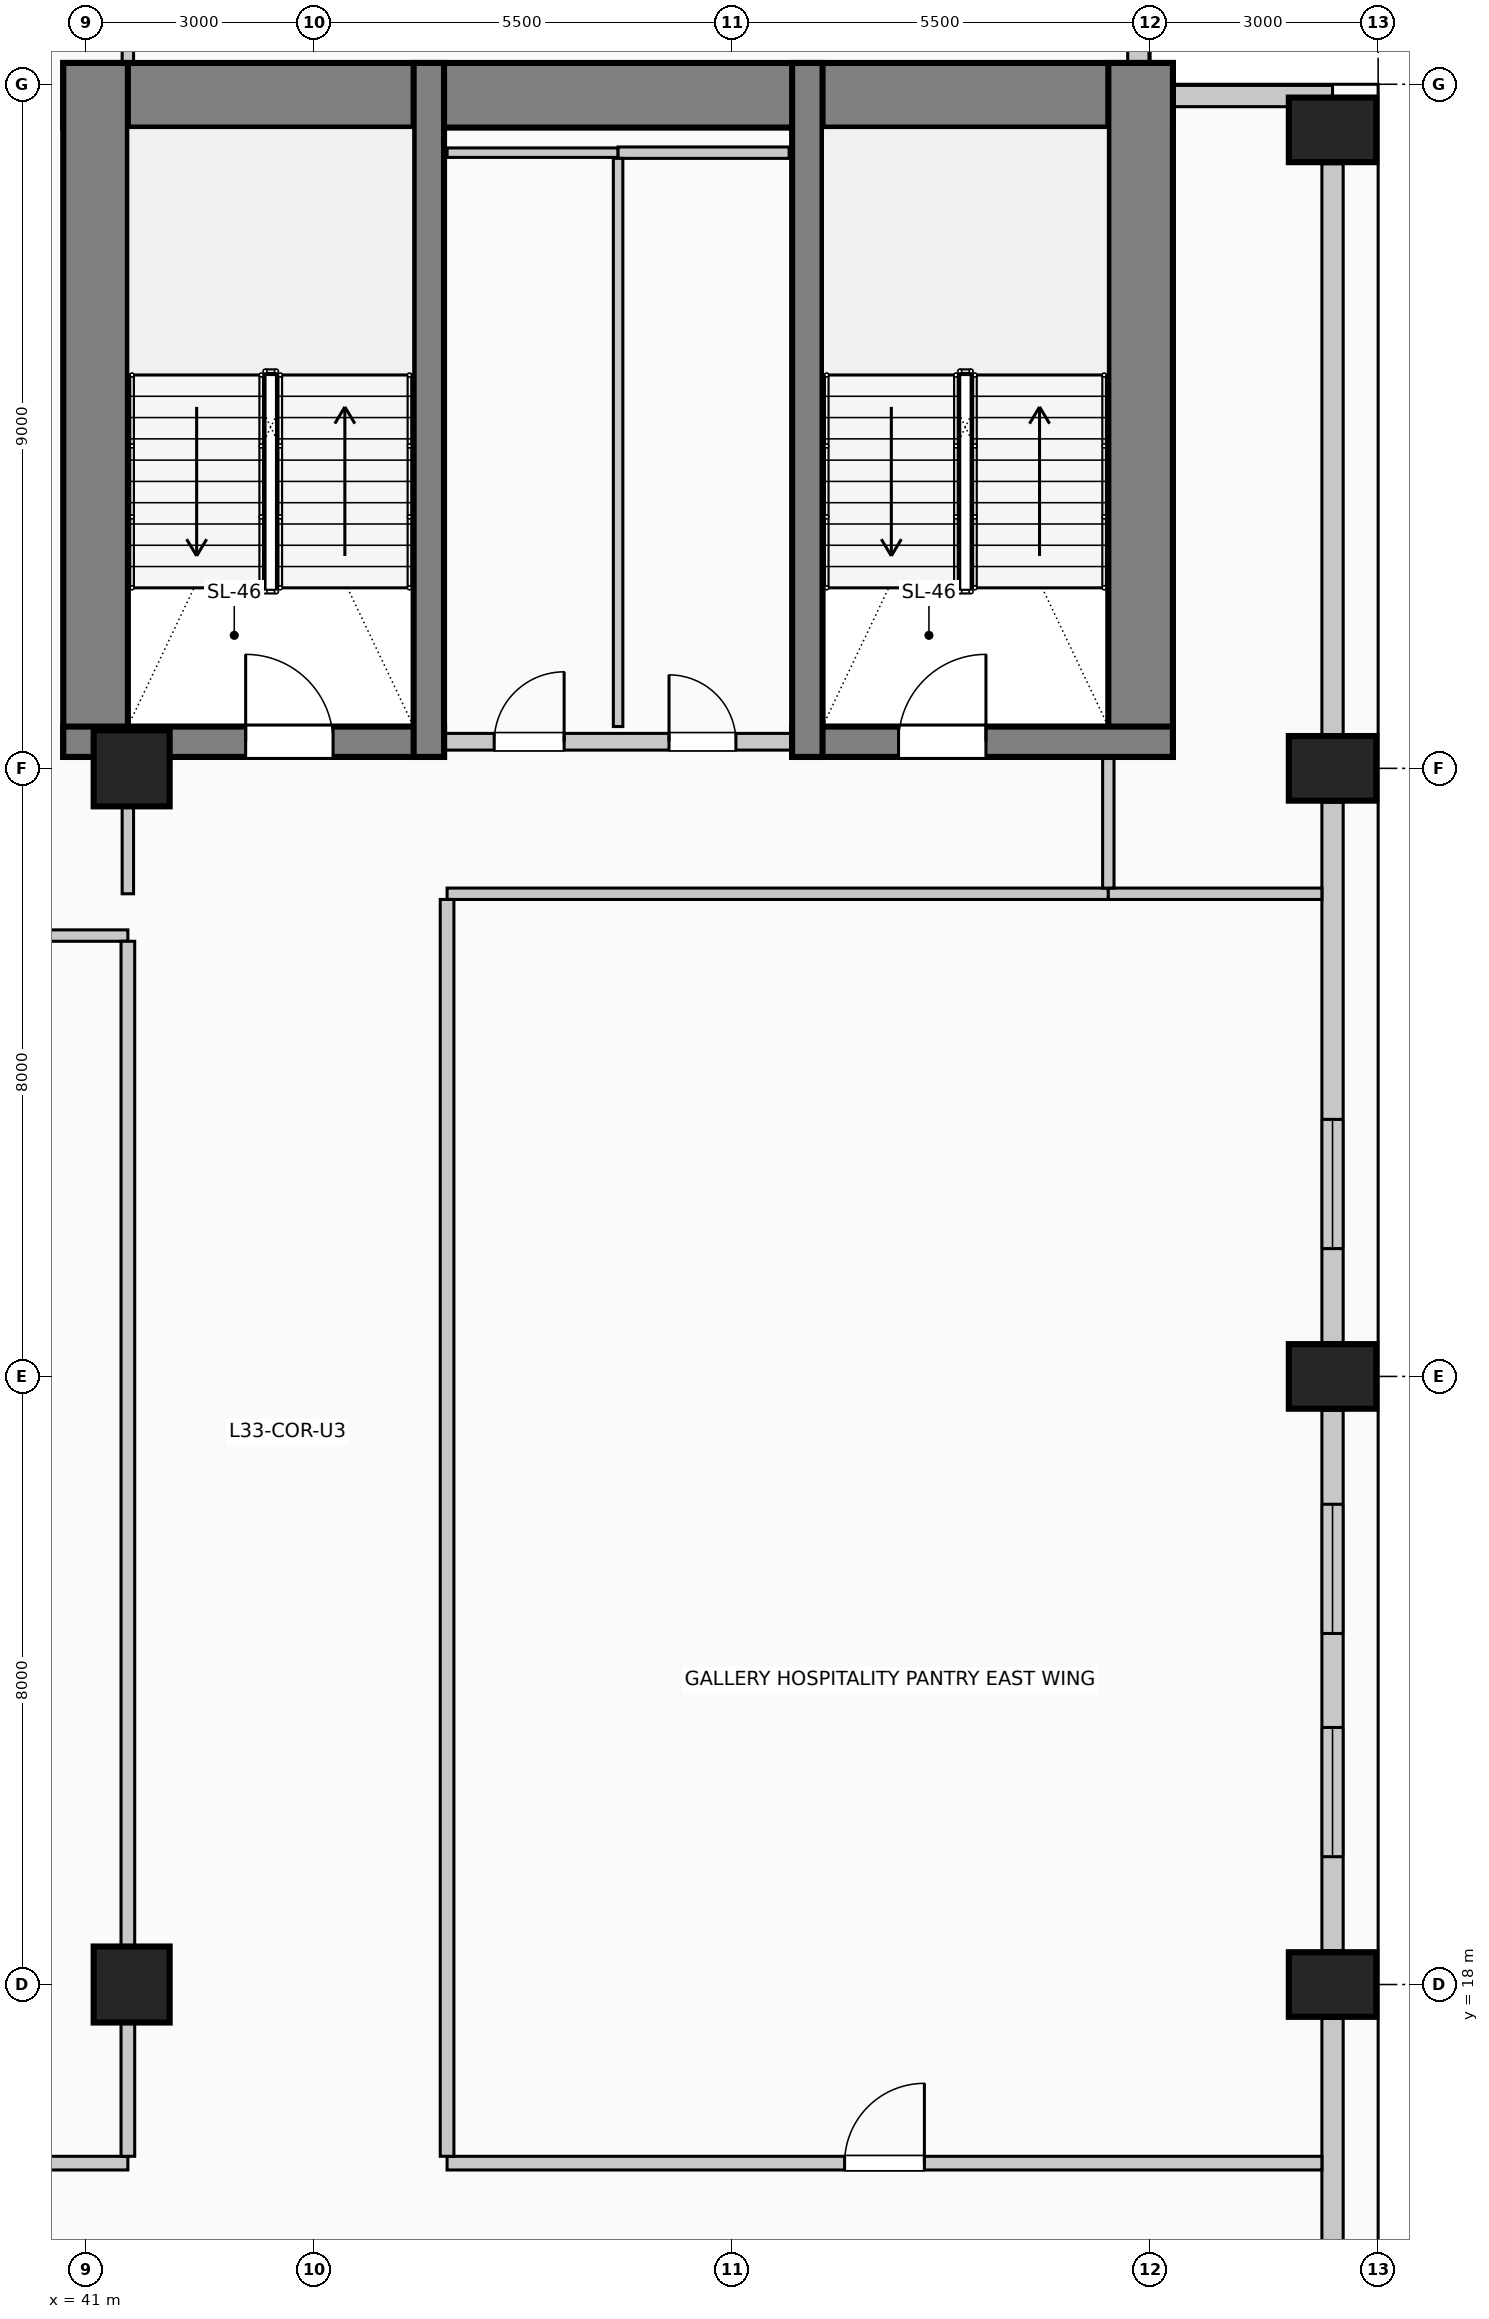
"""IFC4 building model, lengths in metres.
Left out: names, types, materials, properties, quantities, classifications, styles, units other than length and angle.
Written with IfcOpenShell. Run it as: python <this file> out.ifc"""

import sys

from ifc_helpers import new_model, si_unit, direction, frame, frame_2d, origin, origin_2d, place, context, subcontext, project, spatial, rectangle, circle, extrude, element, fill, save


model = new_model("IFC4")
c1 = context("Model", 3, precision=1e-05, world=origin(), true_north=direction((0.0, 1.0)))
c2 = subcontext(c1, "Body", "Model", "MODEL_VIEW")
j1 = project(units=[si_unit("LENGTHUNIT", "METRE"), si_unit("PLANEANGLEUNIT", "RADIAN")], contexts=[c1])
p1 = place(None, origin())
s1 = spatial("IfcSite", under=j1, at=p1, CompositionType="ELEMENT")
p2 = place(p1, origin())
s2 = spatial("IfcBuilding", under=s1, at=p2, CompositionType="ELEMENT")
p3 = place(p2, frame((0.0, 0.0, 136.6)))
s3 = spatial("IfcBuildingStorey", under=s2, at=p3, CompositionType="ELEMENT", Elevation=136.6)
p4 = place(p3, frame((40.7, 42.855, 0.0), z_axis=(0.0, 0.0, 1.0), x_axis=(1.0, 0.0, 0.0)))
e1 = element("IfcWall", 1, at=p4, inside=s3, PredefinedType="SHEAR", context=c2, shape_type="SweptSolid", body=[
    extrude(rectangle(XDim=14.6, YDim=0.85, at=frame_2d((7.3, 0.0))), origin(), (0.0, 0.0, 1.0), 4.0),
])
for number, where, z_axis, x_axis in (
    (2, (41.125, 34.15, 0.0), (0.0, 0.0, 1.0), (0.0, 1.0, 0.0)),
    (3, (54.875, 34.15, 0.0), (0.0, 0.0, 1.0), (0.0, 1.0, 0.0)),
):
    element("IfcWall", number, at=place(p3, frame(where, z_axis=z_axis, x_axis=x_axis)), inside=s3, PredefinedType="SHEAR", context=c2, shape_type="SweptSolid", body=[
        extrude(rectangle(XDim=9.13, YDim=0.85, at=frame_2d((4.565, 0.0))), origin(), (0.0, 0.0, 1.0), 4.0),
    ])
p5 = place(p3, frame((40.7, 34.35, 0.0), z_axis=(0.0, 0.0, 1.0), x_axis=(1.0, 0.0, 0.0)))
e4 = element("IfcWall", 4, at=p5, inside=s3, PredefinedType="SHEAR", context=c2, shape_type="SweptSolid", body=[
    extrude(rectangle(XDim=5.01, YDim=0.4, at=frame_2d((2.505, 0.0))), origin(), (0.0, 0.0, 1.0), 4.0),
])
p6 = place(p5, frame((2.4, 0.0, 0.0)))
e5 = element("IfcOpeningElement", 5, at=p6, cuts=e4, PredefinedType="OPENING", context=c2, shape_type="SweptSolid", body=[
    extrude(rectangle(XDim=1.15, YDim=2.2, at=frame_2d((0.575, 1.1))), frame((0.0, 0.21, 0.0), z_axis=(0.0, -1.0, 0.0), x_axis=(1.0, 0.0, 0.0)), (0.0, 0.0, 1.0), 0.42),
])
p7 = place(p3, frame((45.51, 34.15, 0.0), z_axis=(0.0, 0.0, 1.0), x_axis=(0.0, 1.0, 0.0)))
e6 = element("IfcWall", 6, at=p7, inside=s3, PredefinedType="SHEAR", context=c2, shape_type="SweptSolid", body=[
    extrude(rectangle(XDim=9.13, YDim=0.4, at=frame_2d((4.565, 0.0))), origin(), (0.0, 0.0, 1.0), 4.0),
])
p8 = place(p3, frame((50.29, 34.35, 0.0), z_axis=(0.0, 0.0, 1.0), x_axis=(1.0, 0.0, 0.0)))
e7 = element("IfcWall", 7, at=p8, inside=s3, PredefinedType="SHEAR", context=c2, shape_type="SweptSolid", body=[
    extrude(rectangle(XDim=5.01, YDim=0.4, at=frame_2d((2.505, 0.0))), origin(), (0.0, 0.0, 1.0), 4.0),
])
p9 = place(p8, frame((1.4, 0.0, 0.0)))
e8 = element("IfcOpeningElement", 8, at=p9, cuts=e7, PredefinedType="OPENING", context=c2, shape_type="SweptSolid", body=[
    extrude(rectangle(XDim=1.15, YDim=2.2, at=frame_2d((0.575, 1.1))), frame((0.0, 0.21, 0.0), z_axis=(0.0, -1.0, 0.0), x_axis=(1.0, 0.0, 0.0)), (0.0, 0.0, 1.0), 0.42),
])
p10 = place(p3, frame((50.49, 34.15, 0.0), z_axis=(0.0, 0.0, 1.0), x_axis=(0.0, 1.0, 0.0)))
e9 = element("IfcWall", 9, at=p10, inside=s3, PredefinedType="SHEAR", context=c2, shape_type="SweptSolid", body=[
    extrude(rectangle(XDim=9.13, YDim=0.4, at=frame_2d((4.565, 0.0))), origin(), (0.0, 0.0, 1.0), 4.0),
])
for number, where, z_axis, x_axis in (
    (10, (57.4, 18.0, 0.0), (0.0, 0.0, 1.0), (0.0, 1.0, 0.0)),
    (11, (57.4, 26.0, 0.0), (0.0, 0.0, 1.0), (0.0, 1.0, 0.0)),
    (12, (57.4, 34.0, 0.0), (0.0, 0.0, 1.0), (0.0, 1.0, 0.0)),
    (13, (57.4, 42.4, 0.0), (0.0, 0.0, 1.0), (0.0, 1.0, 0.0)),
):
    element("IfcColumn", number, at=place(p3, frame(where, z_axis=z_axis, x_axis=x_axis)), inside=s3, PredefinedType="COLUMN", context=c2, shape_type="SweptSolid", body=[
        extrude(rectangle(XDim=0.85, YDim=1.15, at=origin_2d()), origin(), (0.0, 0.0, 1.0), 4.0),
    ])
for number, where, z_axis, x_axis in (
    (14, (41.6, 18.0, 0.0), (0.0, 0.0, 1.0), (1.0, 0.0, 0.0)),
    (15, (41.6, 34.0, 0.0), (0.0, 0.0, 1.0), (1.0, 0.0, 0.0)),
):
    element("IfcColumn", number, at=place(p3, frame(where, z_axis=z_axis, x_axis=x_axis)), inside=s3, PredefinedType="COLUMN", context=c2, shape_type="SweptSolid", body=[
        extrude(circle(Radius=0.5, at=origin_2d()), origin(), (0.0, 0.0, 1.0), 4.0),
    ])
p11 = place(p3, frame((57.4, 17.555, 0.0), z_axis=(0.0, 0.0, 1.0), x_axis=(0.0, -1.0, 0.0)))
e16 = element("IfcWall", 16, at=p11, inside=s3, PredefinedType="SOLIDWALL", context=c2, shape_type="SweptSolid", body=[
    extrude(rectangle(XDim=7.11, YDim=0.28, at=frame_2d((3.555, 0.0))), origin(), (0.0, 0.0, 1.0), 2.875),
])
p12 = place(p3, frame((57.4, 25.555, 0.0), z_axis=(0.0, 0.0, 1.0), x_axis=(0.0, -1.0, 0.0)))
e17 = element("IfcWall", 17, at=p12, inside=s3, PredefinedType="SOLIDWALL", context=c2, shape_type="SweptSolid", body=[
    extrude(rectangle(XDim=7.11, YDim=0.28, at=frame_2d((3.555, 0.0))), origin(), (0.0, 0.0, 1.0), 2.875),
])
p13 = place(p12, frame((1.237, 0.0, 0.5)))
e18 = element("IfcOpeningElement", 18, at=p13, cuts=e17, PredefinedType="OPENING", context=c2, shape_type="SweptSolid", body=[
    extrude(rectangle(XDim=1.7, YDim=1.95, at=frame_2d((0.85, 0.975))), frame((0.0, 0.15, 0.0), z_axis=(0.0, -1.0, 0.0), x_axis=(1.0, 0.0, 0.0)), (0.0, 0.0, 1.0), 0.3),
])
p14 = place(p12, frame((4.173, 0.0, 0.5)))
e19 = element("IfcOpeningElement", 19, at=p14, cuts=e17, PredefinedType="OPENING", context=c2, shape_type="SweptSolid", body=[
    extrude(rectangle(XDim=1.7, YDim=1.95, at=frame_2d((0.85, 0.975))), frame((0.0, 0.15, 0.0), z_axis=(0.0, -1.0, 0.0), x_axis=(1.0, 0.0, 0.0)), (0.0, 0.0, 1.0), 0.3),
])
p15 = place(p3, frame((57.4, 33.555, 0.0), z_axis=(0.0, 0.0, 1.0), x_axis=(0.0, -1.0, 0.0)))
e20 = element("IfcWall", 20, at=p15, inside=s3, PredefinedType="SOLIDWALL", context=c2, shape_type="SweptSolid", body=[
    extrude(rectangle(XDim=7.11, YDim=0.28, at=frame_2d((3.555, 0.0))), origin(), (0.0, 0.0, 1.0), 2.875),
])
p16 = place(p15, frame((4.173, 0.0, 0.5)))
e21 = element("IfcOpeningElement", 21, at=p16, cuts=e20, PredefinedType="OPENING", context=c2, shape_type="SweptSolid", body=[
    extrude(rectangle(XDim=1.7, YDim=1.95, at=frame_2d((0.85, 0.975))), frame((0.0, 0.15, 0.0), z_axis=(0.0, -1.0, 0.0), x_axis=(1.0, 0.0, 0.0)), (0.0, 0.0, 1.0), 0.3),
])
p17 = place(p3, frame((57.4, 41.955, 0.0), z_axis=(0.0, 0.0, 1.0), x_axis=(0.0, -1.0, 0.0)))
e22 = element("IfcWall", 22, at=p17, inside=s3, PredefinedType="SOLIDWALL", context=c2, shape_type="SweptSolid", body=[
    extrude(rectangle(XDim=7.51, YDim=0.28, at=frame_2d((3.755, 0.0))), origin(), (0.0, 0.0, 1.0), 2.875),
])
p18 = place(p3, frame((54.845, 45.4, 0.0), z_axis=(0.0, 0.0, 1.0), x_axis=(0.0, -1.0, 0.0)))
e23 = element("IfcWall", 23, at=p18, inside=s3, PredefinedType="SOLIDWALL", context=c2, shape_type="SweptSolid", body=[
    extrude(rectangle(XDim=2.115, YDim=0.28, at=frame_2d((1.058, 0.0))), origin(), (0.0, 0.0, 1.0), 3.725),
])
p19 = place(p3, frame((55.305, 42.845, 0.0), z_axis=(0.0, 0.0, 1.0), x_axis=(1.0, 0.0, 0.0)))
e24 = element("IfcWall", 24, at=p19, inside=s3, PredefinedType="SOLIDWALL", context=c2, shape_type="SweptSolid", body=[
    extrude(rectangle(XDim=2.095, YDim=0.28, at=frame_2d((1.047, 0.0))), origin(), (0.0, 0.0, 1.0), 3.725),
])
p20 = place(p3, frame((45.72, 34.35, 0.0), z_axis=(0.0, 0.0, 1.0), x_axis=(1.0, 0.0, 0.0)))
e25 = element("IfcWall", 25, at=p20, inside=s3, PredefinedType="PARTITIONING", context=c2, shape_type="SweptSolid", body=[
    extrude(rectangle(XDim=4.56, YDim=0.22, at=frame_2d((2.28, 0.0))), origin(), (0.0, 0.0, 1.0), 3.725),
])
p21 = place(p20, frame((0.65, 0.0, 0.0)))
e26 = element("IfcOpeningElement", 26, at=p21, cuts=e25, PredefinedType="OPENING", context=c2, shape_type="SweptSolid", body=[
    extrude(rectangle(XDim=0.92, YDim=2.1, at=frame_2d((0.46, 1.05))), frame((0.0, 0.12, 0.0), z_axis=(0.0, -1.0, 0.0), x_axis=(1.0, 0.0, 0.0)), (0.0, 0.0, 1.0), 0.24),
])
p22 = place(p20, frame((2.95, 0.0, 0.0)))
e27 = element("IfcOpeningElement", 27, at=p22, cuts=e25, PredefinedType="OPENING", context=c2, shape_type="SweptSolid", body=[
    extrude(rectangle(XDim=0.88, YDim=2.1, at=frame_2d((0.44, 1.05))), frame((0.0, 0.12, 0.0), z_axis=(0.0, -1.0, 0.0), x_axis=(1.0, 0.0, 0.0)), (0.0, 0.0, 1.0), 0.24),
])
p23 = place(p3, frame((24.5, 15.65, 0.0), z_axis=(0.0, 0.0, 1.0), x_axis=(1.0, 0.0, 0.0)))
e28 = element("IfcWall", 28, at=p23, inside=s3, PredefinedType="PARTITIONING", context=c2, shape_type="SweptSolid", body=[
    extrude(rectangle(XDim=17.05, YDim=0.18, at=frame_2d((8.525, 0.0))), origin(), (0.0, 0.0, 1.0), 3.725),
])
p24 = place(p23, frame((8.05, 0.0, 0.0)))
e29 = element("IfcOpeningElement", 29, at=p24, cuts=e28, PredefinedType="OPENING", context=c2, shape_type="SweptSolid", body=[
    extrude(rectangle(XDim=0.95, YDim=2.15, at=frame_2d((0.475, 1.075))), frame((0.0, 0.1, 0.0), z_axis=(0.0, -1.0, 0.0), x_axis=(1.0, 0.0, 0.0)), (0.0, 0.0, 1.0), 0.2),
])
p25 = place(p3, frame((45.75, 15.65, 0.0), z_axis=(0.0, 0.0, 1.0), x_axis=(1.0, 0.0, 0.0)))
e30 = element("IfcWall", 30, at=p25, inside=s3, PredefinedType="PARTITIONING", context=c2, shape_type="SweptSolid", body=[
    extrude(rectangle(XDim=11.51, YDim=0.18, at=frame_2d((5.755, 0.0))), origin(), (0.0, 0.0, 1.0), 3.725),
])
p26 = place(p25, frame((5.23, 0.0, 0.0)))
e31 = element("IfcOpeningElement", 31, at=p26, cuts=e30, PredefinedType="OPENING", context=c2, shape_type="SweptSolid", body=[
    extrude(rectangle(XDim=1.05, YDim=2.15, at=frame_2d((0.525, 1.075))), frame((0.0, 0.1, 0.0), z_axis=(0.0, -1.0, 0.0), x_axis=(1.0, 0.0, 0.0)), (0.0, 0.0, 1.0), 0.2),
])
p27 = place(p3, frame((24.5, 31.8, 0.0), z_axis=(0.0, 0.0, 1.0), x_axis=(1.0, 0.0, 0.0)))
e32 = element("IfcWall", 32, at=p27, inside=s3, PredefinedType="PARTITIONING", context=c2, shape_type="SweptSolid", body=[
    extrude(rectangle(XDim=17.05, YDim=0.15, at=frame_2d((8.525, 0.0))), origin(), (0.0, 0.0, 1.0), 3.725),
])
p28 = place(p3, frame((45.75, 32.35, 0.0), z_axis=(0.0, 0.0, 1.0), x_axis=(1.0, 0.0, 0.0)))
e33 = element("IfcWall", 33, at=p28, inside=s3, PredefinedType="PARTITIONING", context=c2, shape_type="SweptSolid", body=[
    extrude(rectangle(XDim=8.7, YDim=0.15, at=frame_2d((4.35, 0.0))), origin(), (0.0, 0.0, 1.0), 3.725),
])
p29 = place(p3, frame((54.45, 32.35, 0.0), z_axis=(0.0, 0.0, 1.0), x_axis=(1.0, 0.0, 0.0)))
e34 = element("IfcWall", 34, at=p29, inside=s3, PredefinedType="PARTITIONING", context=c2, shape_type="SweptSolid", body=[
    extrude(rectangle(XDim=2.81, YDim=0.15, at=frame_2d((1.405, 0.0))), origin(), (0.0, 0.0, 1.0), 3.725),
])
p30 = place(p3, frame((45.75, 42.1, 0.0), z_axis=(0.0, 0.0, 1.0), x_axis=(1.0, 0.0, 0.0)))
e35 = element("IfcWall", 35, at=p30, inside=s3, PredefinedType="PARTITIONING", context=c2, shape_type="SweptSolid", body=[
    extrude(rectangle(XDim=2.25, YDim=0.125, at=frame_2d((1.125, 0.0))), origin(), (0.0, 0.0, 1.0), 3.725),
])
p31 = place(p3, frame((48.0, 42.1, 0.0), z_axis=(0.0, 0.0, 1.0), x_axis=(1.0, 0.0, 0.0)))
e36 = element("IfcWall", 36, at=p31, inside=s3, PredefinedType="PARTITIONING", context=c2, shape_type="SweptSolid", body=[
    extrude(rectangle(XDim=2.25, YDim=0.15, at=frame_2d((1.125, 0.0))), origin(), (0.0, 0.0, 1.0), 3.725),
])
p32 = place(p3, frame((41.55, 15.74, 0.0), z_axis=(0.0, 0.0, 1.0), x_axis=(0.0, 1.0, 0.0)))
e37 = element("IfcWall", 37, at=p32, inside=s3, PredefinedType="PARTITIONING", context=c2, shape_type="SweptSolid", body=[
    extrude(rectangle(XDim=1.76, YDim=0.18, at=frame_2d((0.88, 0.0))), origin(), (0.0, 0.0, 1.0), 3.07),
])
p33 = place(p3, frame((41.55, 18.5, 0.0), z_axis=(0.0, 0.0, 1.0), x_axis=(0.0, 1.0, 0.0)))
e38 = element("IfcWall", 38, at=p33, inside=s3, PredefinedType="PARTITIONING", context=c2, shape_type="SweptSolid", body=[
    extrude(rectangle(XDim=13.225, YDim=0.18, at=frame_2d((6.613, 0.0))), origin(), (0.0, 0.0, 1.0), 3.07),
])
p34 = place(p3, frame((41.55, 32.35, 0.0), z_axis=(0.0, 0.0, 1.0), x_axis=(0.0, 1.0, 0.0)))
e39 = element("IfcWall", 39, at=p34, inside=s3, PredefinedType="PARTITIONING", context=c2, shape_type="SweptSolid", body=[
    extrude(rectangle(XDim=1.15, YDim=0.15, at=frame_2d((0.575, 0.0))), origin(), (0.0, 0.0, 1.0), 3.07),
])
p35 = place(p3, frame((41.55, 43.28, 0.0), z_axis=(0.0, 0.0, 1.0), x_axis=(0.0, 1.0, 0.0)))
e40 = element("IfcWall", 40, at=p35, inside=s3, PredefinedType="PARTITIONING", context=c2, shape_type="SweptSolid", body=[
    extrude(rectangle(XDim=1.42, YDim=0.15, at=frame_2d((0.71, 0.0))), origin(), (0.0, 0.0, 1.0), 3.725),
])
p36 = place(p3, frame((45.75, 15.74, 0.0), z_axis=(0.0, 0.0, 1.0), x_axis=(0.0, 1.0, 0.0)))
e41 = element("IfcWall", 41, at=p36, inside=s3, PredefinedType="PARTITIONING", context=c2, shape_type="SweptSolid", body=[
    extrude(rectangle(XDim=16.535, YDim=0.18, at=frame_2d((8.268, 0.0))), origin(), (0.0, 0.0, 1.0), 3.725),
])
p37 = place(p3, frame((48.0, 34.55, 0.0), z_axis=(0.0, 0.0, 1.0), x_axis=(0.0, 1.0, 0.0)))
e42 = element("IfcWall", 42, at=p37, inside=s3, PredefinedType="PARTITIONING", context=c2, shape_type="SweptSolid", body=[
    extrude(rectangle(XDim=7.475, YDim=0.125, at=frame_2d((3.737, 0.0))), origin(), (0.0, 0.0, 1.0), 3.725),
])
p38 = place(p3, frame((54.45, 32.425, 0.0), z_axis=(0.0, 0.0, 1.0), x_axis=(0.0, 1.0, 0.0)))
e43 = element("IfcWall", 43, at=p38, inside=s3, PredefinedType="PARTITIONING", context=c2, shape_type="SweptSolid", body=[
    extrude(rectangle(XDim=1.725, YDim=0.15, at=frame_2d((0.862, 0.0))), origin(), (0.0, 0.0, 1.0), 3.725),
])
p39 = place(p13, origin())
e44 = element("IfcWindow", 44, at=p39, inside=s3, PartitioningType="SINGLE_PANEL", PredefinedType="WINDOW", context=c2, shape_type="SweptSolid", body=[
    extrude(rectangle(XDim=1.7, YDim=1.95, at=frame_2d((0.85, 0.975))), frame((0.0, 0.03, 0.0), z_axis=(0.0, -1.0, 0.0), x_axis=(1.0, 0.0, 0.0)), (0.0, 0.0, 1.0), 0.06),
])
fill(e18, e44)
p40 = place(p14, origin())
e45 = element("IfcWindow", 45, at=p40, inside=s3, PartitioningType="SINGLE_PANEL", PredefinedType="WINDOW", context=c2, shape_type="SweptSolid", body=[
    extrude(rectangle(XDim=1.7, YDim=1.95, at=frame_2d((0.85, 0.975))), frame((0.0, 0.03, 0.0), z_axis=(0.0, -1.0, 0.0), x_axis=(1.0, 0.0, 0.0)), (0.0, 0.0, 1.0), 0.06),
])
fill(e19, e45)
p41 = place(p16, origin())
e46 = element("IfcWindow", 46, at=p41, inside=s3, PartitioningType="SINGLE_PANEL", PredefinedType="WINDOW", context=c2, shape_type="SweptSolid", body=[
    extrude(rectangle(XDim=1.7, YDim=1.95, at=frame_2d((0.85, 0.975))), frame((0.0, 0.03, 0.0), z_axis=(0.0, -1.0, 0.0), x_axis=(1.0, 0.0, 0.0)), (0.0, 0.0, 1.0), 0.06),
])
fill(e21, e46)
p42 = place(p6, origin())
e47 = element("IfcDoor", 47, at=p42, inside=s3, OperationType="SINGLE_SWING_LEFT", PredefinedType="DOOR", context=c2, shape_type="SweptSolid", body=[
    extrude(rectangle(XDim=1.15, YDim=2.2, at=frame_2d((0.575, 1.1))), frame((0.0, 0.025, 0.0), z_axis=(0.0, -1.0, 0.0), x_axis=(1.0, 0.0, 0.0)), (0.0, 0.0, 1.0), 0.05),
])
fill(e5, e47)
p43 = place(p21, origin())
e48 = element("IfcDoor", 48, at=p43, inside=s3, OperationType="SINGLE_SWING_RIGHT", PredefinedType="DOOR", context=c2, shape_type="SweptSolid", body=[
    extrude(rectangle(XDim=0.92, YDim=2.1, at=frame_2d((0.46, 1.05))), frame((0.0, 0.025, 0.0), z_axis=(0.0, -1.0, 0.0), x_axis=(1.0, 0.0, 0.0)), (0.0, 0.0, 1.0), 0.05),
])
fill(e26, e48)
p44 = place(p22, origin())
e49 = element("IfcDoor", 49, at=p44, inside=s3, OperationType="SINGLE_SWING_LEFT", PredefinedType="DOOR", context=c2, shape_type="SweptSolid", body=[
    extrude(rectangle(XDim=0.88, YDim=2.1, at=frame_2d((0.44, 1.05))), frame((0.0, 0.025, 0.0), z_axis=(0.0, -1.0, 0.0), x_axis=(1.0, 0.0, 0.0)), (0.0, 0.0, 1.0), 0.05),
])
fill(e27, e49)
p45 = place(p9, origin())
e50 = element("IfcDoor", 50, at=p45, inside=s3, OperationType="SINGLE_SWING_RIGHT", PredefinedType="DOOR", context=c2, shape_type="SweptSolid", body=[
    extrude(rectangle(XDim=1.15, YDim=2.2, at=frame_2d((0.575, 1.1))), frame((0.0, 0.025, 0.0), z_axis=(0.0, -1.0, 0.0), x_axis=(1.0, 0.0, 0.0)), (0.0, 0.0, 1.0), 0.05),
])
fill(e8, e50)
p46 = place(p26, origin())
e51 = element("IfcDoor", 51, at=p46, inside=s3, OperationType="SINGLE_SWING_RIGHT", PredefinedType="DOOR", context=c2, shape_type="SweptSolid", body=[
    extrude(rectangle(XDim=1.05, YDim=2.15, at=frame_2d((0.525, 1.075))), frame((0.0, 0.025, 0.0), z_axis=(0.0, -1.0, 0.0), x_axis=(1.0, 0.0, 0.0)), (0.0, 0.0, 1.0), 0.05),
])
fill(e31, e51)
save(model, sys.argv[1])
